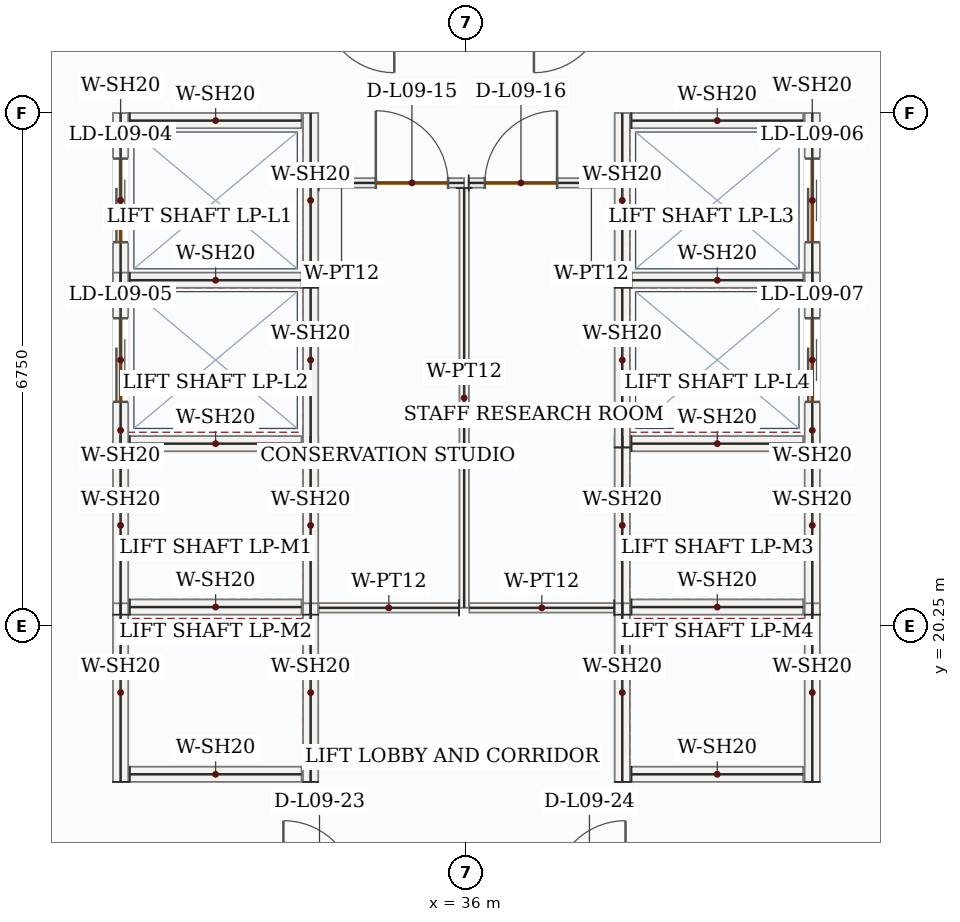
"""IFC4 building model, lengths in metres.
Left out: names, types, materials, properties, quantities, classifications, styles, units other than length and angle.
Written with IfcOpenShell. Run it as: python <this file> out.ifc"""

import sys

from ifc_helpers import new_model, si_unit, direction, frame, frame_2d, origin, place, context, subcontext, project, spatial, rectangle, extrude, source, transform, mapped, element, fill, save


model = new_model("IFC4")
c1 = context("Model", 3, precision=1e-05, world=origin(), true_north=direction((0.0, 1.0)))
c2 = subcontext(c1, "Body", "Model", "MODEL_VIEW")
j1 = project(units=[si_unit("LENGTHUNIT", "METRE"), si_unit("PLANEANGLEUNIT", "RADIAN")], contexts=[c1])
p1 = place(None, origin())
s1 = spatial("IfcSite", under=j1, at=p1, CompositionType="ELEMENT")
p2 = place(p1, origin())
s2 = spatial("IfcBuilding", under=s1, at=p2, CompositionType="ELEMENT")
p3 = place(p2, frame((0.0, 0.0, 45.9)))
s3 = spatial("IfcBuildingStorey", under=s2, at=p3, CompositionType="ELEMENT", Elevation=45.9)
m1 = source(origin(), c2, "Body", "SweptSolid", [
    extrude(rectangle(XDim=2.35, YDim=0.2, at=frame_2d((1.175, 0.0))), origin(), (0.0, 0.0, 1.0), 3.95),
])
for number, where, z_axis, x_axis in (
    (1, (31.45, 20.4, 0.0), (0.0, 0.0, 1.0), (0.0, 1.0, 0.0)),
    (2, (33.95, 20.4, 0.0), (0.0, 0.0, 1.0), (0.0, 1.0, 0.0)),
):
    element("IfcWall", number, at=place(p3, frame(where, z_axis=z_axis, x_axis=x_axis)), inside=s3, PredefinedType="SOLIDWALL", context=c2, shape_type="MappedRepresentation", body=[
        mapped(m1, transform((0.0, 0.0, 0.0), x_axis=(1.0, 0.0, 0.0), y_axis=(0.0, 1.0, 0.0), z_axis=(0.0, 0.0, 1.0), scale=1.0)),
    ])
m2 = source(origin(), c2, "Body", "SweptSolid", [
    extrude(rectangle(XDim=2.26, YDim=0.2, at=frame_2d((1.13, 0.0))), origin(), (0.0, 0.0, 1.0), 3.95),
])
for number, where, z_axis, x_axis in (
    (3, (31.57, 20.5, 0.0), (0.0, 0.0, 1.0), (1.0, 0.0, 0.0)),
    (4, (31.57, 22.65, 0.0), (0.0, 0.0, 1.0), (1.0, 0.0, 0.0)),
):
    element("IfcWall", number, at=place(p3, frame(where, z_axis=z_axis, x_axis=x_axis)), inside=s3, PredefinedType="SOLIDWALL", context=c2, shape_type="MappedRepresentation", body=[
        mapped(m2, transform((0.0, 0.0, 0.0), x_axis=(1.0, 0.0, 0.0), y_axis=(0.0, 1.0, 0.0), z_axis=(0.0, 0.0, 1.0), scale=1.0)),
    ])
for number, where, z_axis, x_axis in (
    (5, (31.45, 18.2, 0.0), (0.0, 0.0, 1.0), (0.0, 1.0, 0.0)),
    (6, (33.95, 18.2, 0.0), (0.0, 0.0, 1.0), (0.0, 1.0, 0.0)),
):
    element("IfcWall", number, at=place(p3, frame(where, z_axis=z_axis, x_axis=x_axis)), inside=s3, PredefinedType="SOLIDWALL", context=c2, shape_type="MappedRepresentation", body=[
        mapped(m1, transform((0.0, 0.0, 0.0), x_axis=(1.0, 0.0, 0.0), y_axis=(0.0, 1.0, 0.0), z_axis=(0.0, 0.0, 1.0), scale=1.0)),
    ])
p4 = place(p3, frame((31.57, 18.3, 0.0), z_axis=(0.0, 0.0, 1.0), x_axis=(1.0, 0.0, 0.0)))
e7 = element("IfcWall", 7, at=p4, inside=s3, PredefinedType="SOLIDWALL", context=c2, shape_type="MappedRepresentation", body=[
    mapped(m2, transform((0.0, 0.0, 0.0), x_axis=(1.0, 0.0, 0.0), y_axis=(0.0, 1.0, 0.0), z_axis=(0.0, 0.0, 1.0), scale=1.0)),
])
for number, where, z_axis, x_axis in (
    (8, (38.05, 20.4, 0.0), (0.0, 0.0, 1.0), (0.0, 1.0, 0.0)),
    (9, (40.55, 20.4, 0.0), (0.0, 0.0, 1.0), (0.0, 1.0, 0.0)),
):
    element("IfcWall", number, at=place(p3, frame(where, z_axis=z_axis, x_axis=x_axis)), inside=s3, PredefinedType="SOLIDWALL", context=c2, shape_type="MappedRepresentation", body=[
        mapped(m1, transform((0.0, 0.0, 0.0), x_axis=(1.0, 0.0, 0.0), y_axis=(0.0, 1.0, 0.0), z_axis=(0.0, 0.0, 1.0), scale=1.0)),
    ])
for number, where, z_axis, x_axis in (
    (10, (38.17, 20.5, 0.0), (0.0, 0.0, 1.0), (1.0, 0.0, 0.0)),
    (11, (38.17, 22.65, 0.0), (0.0, 0.0, 1.0), (1.0, 0.0, 0.0)),
):
    element("IfcWall", number, at=place(p3, frame(where, z_axis=z_axis, x_axis=x_axis)), inside=s3, PredefinedType="SOLIDWALL", context=c2, shape_type="MappedRepresentation", body=[
        mapped(m2, transform((0.0, 0.0, 0.0), x_axis=(1.0, 0.0, 0.0), y_axis=(0.0, 1.0, 0.0), z_axis=(0.0, 0.0, 1.0), scale=1.0)),
    ])
for number, where, z_axis, x_axis in (
    (12, (38.05, 18.2, 0.0), (0.0, 0.0, 1.0), (0.0, 1.0, 0.0)),
    (13, (40.55, 18.2, 0.0), (0.0, 0.0, 1.0), (0.0, 1.0, 0.0)),
):
    element("IfcWall", number, at=place(p3, frame(where, z_axis=z_axis, x_axis=x_axis)), inside=s3, PredefinedType="SOLIDWALL", context=c2, shape_type="MappedRepresentation", body=[
        mapped(m1, transform((0.0, 0.0, 0.0), x_axis=(1.0, 0.0, 0.0), y_axis=(0.0, 1.0, 0.0), z_axis=(0.0, 0.0, 1.0), scale=1.0)),
    ])
p5 = place(p3, frame((38.17, 18.3, 0.0), z_axis=(0.0, 0.0, 1.0), x_axis=(1.0, 0.0, 0.0)))
e14 = element("IfcWall", 14, at=p5, inside=s3, PredefinedType="SOLIDWALL", context=c2, shape_type="MappedRepresentation", body=[
    mapped(m2, transform((0.0, 0.0, 0.0), x_axis=(1.0, 0.0, 0.0), y_axis=(0.0, 1.0, 0.0), z_axis=(0.0, 0.0, 1.0), scale=1.0)),
])
p6 = place(p3, frame((31.45, 24.7, 0.0), z_axis=(0.0, 0.0, 1.0), x_axis=(0.0, 1.0, 0.0)))
e15 = element("IfcWall", 15, at=p6, inside=s3, PredefinedType="SOLIDWALL", context=c2, shape_type="SweptSolid", body=[
    extrude(rectangle(XDim=2.3, YDim=0.2, at=frame_2d((1.15, 0.0))), origin(), (0.0, 0.0, 1.0), 3.95),
])
p7 = place(p6, frame((0.6, 0.0, 0.0)))
e16 = element("IfcOpeningElement", 16, at=p7, cuts=e15, PredefinedType="OPENING", context=c2, shape_type="SweptSolid", body=[
    extrude(rectangle(XDim=1.1, YDim=2.15, at=frame_2d((0.55, 1.075))), frame((0.0, 0.11, 0.0), z_axis=(0.0, -1.0, 0.0), x_axis=(1.0, 0.0, 0.0)), (0.0, 0.0, 1.0), 0.22),
])
m3 = source(origin(), c2, "Body", "SweptSolid", [
    extrude(rectangle(XDim=2.3, YDim=0.2, at=frame_2d((1.15, 0.0))), origin(), (0.0, 0.0, 1.0), 3.95),
])
p8 = place(p3, frame((33.95, 24.7, 0.0), z_axis=(0.0, 0.0, 1.0), x_axis=(0.0, 1.0, 0.0)))
e17 = element("IfcWall", 17, at=p8, inside=s3, PredefinedType="SOLIDWALL", context=c2, shape_type="MappedRepresentation", body=[
    mapped(m3, transform((0.0, 0.0, 0.0), x_axis=(1.0, 0.0, 0.0), y_axis=(0.0, 1.0, 0.0), z_axis=(0.0, 0.0, 1.0), scale=1.0)),
])
for number, where, z_axis, x_axis in (
    (18, (31.57, 24.8, 0.0), (0.0, 0.0, 1.0), (1.0, 0.0, 0.0)),
    (19, (31.57, 26.9, 0.0), (0.0, 0.0, 1.0), (1.0, 0.0, 0.0)),
):
    element("IfcWall", number, at=place(p3, frame(where, z_axis=z_axis, x_axis=x_axis)), inside=s3, PredefinedType="SOLIDWALL", context=c2, shape_type="MappedRepresentation", body=[
        mapped(m2, transform((0.0, 0.0, 0.0), x_axis=(1.0, 0.0, 0.0), y_axis=(0.0, 1.0, 0.0), z_axis=(0.0, 0.0, 1.0), scale=1.0)),
    ])
p9 = place(p3, frame((31.45, 22.6, 0.0), z_axis=(0.0, 0.0, 1.0), x_axis=(0.0, 1.0, 0.0)))
e20 = element("IfcWall", 20, at=p9, inside=s3, PredefinedType="SOLIDWALL", context=c2, shape_type="SweptSolid", body=[
    extrude(rectangle(XDim=2.3, YDim=0.2, at=frame_2d((1.15, 0.0))), origin(), (0.0, 0.0, 1.0), 3.95),
])
p10 = place(p9, frame((0.6, 0.0, 0.0)))
e21 = element("IfcOpeningElement", 21, at=p10, cuts=e20, PredefinedType="OPENING", context=c2, shape_type="SweptSolid", body=[
    extrude(rectangle(XDim=1.1, YDim=2.15, at=frame_2d((0.55, 1.075))), frame((0.0, 0.11, 0.0), z_axis=(0.0, -1.0, 0.0), x_axis=(1.0, 0.0, 0.0)), (0.0, 0.0, 1.0), 0.22),
])
m4 = source(origin(), c2, "Body", "SweptSolid", [
    extrude(rectangle(XDim=2.3, YDim=0.2, at=frame_2d((1.15, 0.0))), origin(), (0.0, 0.0, 1.0), 3.95),
])
p11 = place(p3, frame((33.95, 22.6, 0.0), z_axis=(0.0, 0.0, 1.0), x_axis=(0.0, 1.0, 0.0)))
e22 = element("IfcWall", 22, at=p11, inside=s3, PredefinedType="SOLIDWALL", context=c2, shape_type="MappedRepresentation", body=[
    mapped(m4, transform((0.0, 0.0, 0.0), x_axis=(1.0, 0.0, 0.0), y_axis=(0.0, 1.0, 0.0), z_axis=(0.0, 0.0, 1.0), scale=1.0)),
])
p12 = place(p3, frame((38.05, 24.7, 0.0), z_axis=(0.0, 0.0, 1.0), x_axis=(0.0, 1.0, 0.0)))
e23 = element("IfcWall", 23, at=p12, inside=s3, PredefinedType="SOLIDWALL", context=c2, shape_type="MappedRepresentation", body=[
    mapped(m3, transform((0.0, 0.0, 0.0), x_axis=(1.0, 0.0, 0.0), y_axis=(0.0, 1.0, 0.0), z_axis=(0.0, 0.0, 1.0), scale=1.0)),
])
p13 = place(p3, frame((40.55, 24.7, 0.0), z_axis=(0.0, 0.0, 1.0), x_axis=(0.0, 1.0, 0.0)))
e24 = element("IfcWall", 24, at=p13, inside=s3, PredefinedType="SOLIDWALL", context=c2, shape_type="SweptSolid", body=[
    extrude(rectangle(XDim=2.3, YDim=0.2, at=frame_2d((1.15, 0.0))), origin(), (0.0, 0.0, 1.0), 3.95),
])
p14 = place(p13, frame((0.6, 0.0, 0.0)))
e25 = element("IfcOpeningElement", 25, at=p14, cuts=e24, PredefinedType="OPENING", context=c2, shape_type="SweptSolid", body=[
    extrude(rectangle(XDim=1.1, YDim=2.15, at=frame_2d((0.55, 1.075))), frame((0.0, 0.11, 0.0), z_axis=(0.0, -1.0, 0.0), x_axis=(1.0, 0.0, 0.0)), (0.0, 0.0, 1.0), 0.22),
])
for number, where, z_axis, x_axis in (
    (26, (38.17, 24.8, 0.0), (0.0, 0.0, 1.0), (1.0, 0.0, 0.0)),
    (27, (38.17, 26.9, 0.0), (0.0, 0.0, 1.0), (1.0, 0.0, 0.0)),
):
    element("IfcWall", number, at=place(p3, frame(where, z_axis=z_axis, x_axis=x_axis)), inside=s3, PredefinedType="SOLIDWALL", context=c2, shape_type="MappedRepresentation", body=[
        mapped(m2, transform((0.0, 0.0, 0.0), x_axis=(1.0, 0.0, 0.0), y_axis=(0.0, 1.0, 0.0), z_axis=(0.0, 0.0, 1.0), scale=1.0)),
    ])
p15 = place(p3, frame((38.05, 22.6, 0.0), z_axis=(0.0, 0.0, 1.0), x_axis=(0.0, 1.0, 0.0)))
e28 = element("IfcWall", 28, at=p15, inside=s3, PredefinedType="SOLIDWALL", context=c2, shape_type="MappedRepresentation", body=[
    mapped(m4, transform((0.0, 0.0, 0.0), x_axis=(1.0, 0.0, 0.0), y_axis=(0.0, 1.0, 0.0), z_axis=(0.0, 0.0, 1.0), scale=1.0)),
])
p16 = place(p3, frame((40.55, 22.6, 0.0), z_axis=(0.0, 0.0, 1.0), x_axis=(0.0, 1.0, 0.0)))
e29 = element("IfcWall", 29, at=p16, inside=s3, PredefinedType="SOLIDWALL", context=c2, shape_type="SweptSolid", body=[
    extrude(rectangle(XDim=2.3, YDim=0.2, at=frame_2d((1.15, 0.0))), origin(), (0.0, 0.0, 1.0), 3.95),
])
p17 = place(p16, frame((0.6, 0.0, 0.0)))
e30 = element("IfcOpeningElement", 30, at=p17, cuts=e29, PredefinedType="OPENING", context=c2, shape_type="SweptSolid", body=[
    extrude(rectangle(XDim=1.1, YDim=2.15, at=frame_2d((0.55, 1.075))), frame((0.0, 0.11, 0.0), z_axis=(0.0, -1.0, 0.0), x_axis=(1.0, 0.0, 0.0)), (0.0, 0.0, 1.0), 0.22),
])
p18 = place(p3, frame((34.055, 26.08, 0.0), z_axis=(0.0, 0.0, 1.0), x_axis=(1.0, 0.0, 0.0)))
e31 = element("IfcWall", 31, at=p18, inside=s3, PredefinedType="PARTITIONING", context=c2, shape_type="SweptSolid", body=[
    extrude(rectangle(XDim=1.915, YDim=0.125, at=frame_2d((0.958, 0.0))), origin(), (0.0, 0.0, 1.0), 3.95),
])
p19 = place(p18, frame((0.753, 0.0, 0.0)))
e32 = element("IfcOpeningElement", 32, at=p19, cuts=e31, PredefinedType="OPENING", context=c2, shape_type="SweptSolid", body=[
    extrude(rectangle(XDim=0.95, YDim=2.15, at=frame_2d((0.475, 1.075))), frame((0.0, 0.073, 0.0), z_axis=(0.0, -1.0, 0.0), x_axis=(1.0, 0.0, 0.0)), (0.0, 0.0, 1.0), 0.145),
])
m5 = source(origin(), c2, "Body", "SweptSolid", [
    extrude(rectangle(XDim=5.522, YDim=0.125, at=frame_2d((2.761, 0.0))), origin(), (0.0, 0.0, 1.0), 3.95),
])
p20 = place(p3, frame((35.97, 26.012, 0.0), z_axis=(0.0, 0.0, 1.0), x_axis=(0.0, -1.0, 0.0)))
e33 = element("IfcWall", 33, at=p20, inside=s3, PredefinedType="PARTITIONING", context=c2, shape_type="MappedRepresentation", body=[
    mapped(m5, transform((0.0, 0.0, 0.0), x_axis=(1.0, 0.0, 0.0), y_axis=(0.0, 1.0, 0.0), z_axis=(0.0, 0.0, 1.0), scale=1.0)),
])
m6 = source(origin(), c2, "Body", "SweptSolid", [
    extrude(rectangle(XDim=1.848, YDim=0.125, at=frame_2d((0.924, 0.0))), origin(), (0.0, 0.0, 1.0), 3.95),
])
p21 = place(p3, frame((35.903, 20.49, 0.0), z_axis=(0.0, 0.0, 1.0), x_axis=(-1.0, 0.0, 0.0)))
e34 = element("IfcWall", 34, at=p21, inside=s3, PredefinedType="PARTITIONING", context=c2, shape_type="MappedRepresentation", body=[
    mapped(m6, transform((0.0, 0.0, 0.0), x_axis=(1.0, 0.0, 0.0), y_axis=(0.0, 1.0, 0.0), z_axis=(0.0, 0.0, 1.0), scale=1.0)),
])
p22 = place(p3, frame((36.03, 26.08, 0.0), z_axis=(0.0, 0.0, 1.0), x_axis=(1.0, 0.0, 0.0)))
e35 = element("IfcWall", 35, at=p22, inside=s3, PredefinedType="PARTITIONING", context=c2, shape_type="SweptSolid", body=[
    extrude(rectangle(XDim=1.915, YDim=0.125, at=frame_2d((0.958, 0.0))), origin(), (0.0, 0.0, 1.0), 3.95),
])
p23 = place(p22, frame((0.212, 0.0, 0.0)))
e36 = element("IfcOpeningElement", 36, at=p23, cuts=e35, PredefinedType="OPENING", context=c2, shape_type="SweptSolid", body=[
    extrude(rectangle(XDim=0.95, YDim=2.15, at=frame_2d((0.475, 1.075))), frame((0.0, 0.073, 0.0), z_axis=(0.0, -1.0, 0.0), x_axis=(1.0, 0.0, 0.0)), (0.0, 0.0, 1.0), 0.145),
])
m7 = source(origin(), c2, "Body", "SweptSolid", [
    extrude(rectangle(XDim=1.907, YDim=0.125, at=frame_2d((0.954, 0.0))), origin(), (0.0, 0.0, 1.0), 3.95),
])
p24 = place(p3, frame((37.945, 20.49, 0.0), z_axis=(0.0, 0.0, 1.0), x_axis=(-1.0, 0.0, 0.0)))
e37 = element("IfcWall", 37, at=p24, inside=s3, PredefinedType="PARTITIONING", context=c2, shape_type="MappedRepresentation", body=[
    mapped(m7, transform((0.0, 0.0, 0.0), x_axis=(1.0, 0.0, 0.0), y_axis=(0.0, 1.0, 0.0), z_axis=(0.0, 0.0, 1.0), scale=1.0)),
])
m8 = source(origin(), c2, "Body", "SweptSolid", [
    extrude(rectangle(XDim=1.1, YDim=2.15, at=frame_2d((0.55, 1.075))), frame((0.0, 0.025, 0.0), z_axis=(0.0, -1.0, 0.0), x_axis=(1.0, 0.0, 0.0)), (0.0, 0.0, 1.0), 0.05),
])
p25 = place(p7, origin())
e38 = element("IfcDoor", 38, at=p25, inside=s3, OperationType="DOUBLE_DOOR_SLIDING", PredefinedType="DOOR", context=c2, shape_type="MappedRepresentation", body=[
    mapped(m8, transform((0.0, 0.0, 0.0), x_axis=(1.0, 0.0, 0.0), y_axis=(0.0, 1.0, 0.0), z_axis=(0.0, 0.0, 1.0), scale=1.0)),
])
fill(e16, e38)
p26 = place(p10, origin())
e39 = element("IfcDoor", 39, at=p26, inside=s3, OperationType="DOUBLE_DOOR_SLIDING", PredefinedType="DOOR", context=c2, shape_type="MappedRepresentation", body=[
    mapped(m8, transform((0.0, 0.0, 0.0), x_axis=(1.0, 0.0, 0.0), y_axis=(0.0, 1.0, 0.0), z_axis=(0.0, 0.0, 1.0), scale=1.0)),
])
fill(e21, e39)
p27 = place(p14, origin())
e40 = element("IfcDoor", 40, at=p27, inside=s3, OperationType="DOUBLE_DOOR_SLIDING", PredefinedType="DOOR", context=c2, shape_type="MappedRepresentation", body=[
    mapped(m8, transform((0.0, 0.0, 0.0), x_axis=(1.0, 0.0, 0.0), y_axis=(0.0, 1.0, 0.0), z_axis=(0.0, 0.0, 1.0), scale=1.0)),
])
fill(e25, e40)
p28 = place(p17, origin())
e41 = element("IfcDoor", 41, at=p28, inside=s3, OperationType="DOUBLE_DOOR_SLIDING", PredefinedType="DOOR", context=c2, shape_type="MappedRepresentation", body=[
    mapped(m8, transform((0.0, 0.0, 0.0), x_axis=(1.0, 0.0, 0.0), y_axis=(0.0, 1.0, 0.0), z_axis=(0.0, 0.0, 1.0), scale=1.0)),
])
fill(e30, e41)
m9 = source(origin(), c2, "Body", "SweptSolid", [
    extrude(rectangle(XDim=0.95, YDim=2.15, at=frame_2d((0.475, 1.075))), frame((0.0, 0.025, 0.0), z_axis=(0.0, -1.0, 0.0), x_axis=(1.0, 0.0, 0.0)), (0.0, 0.0, 1.0), 0.05),
])
p29 = place(p19, origin())
e42 = element("IfcDoor", 42, at=p29, inside=s3, OperationType="SINGLE_SWING_LEFT", PredefinedType="DOOR", context=c2, shape_type="MappedRepresentation", body=[
    mapped(m9, transform((0.0, 0.0, 0.0), x_axis=(1.0, 0.0, 0.0), y_axis=(0.0, 1.0, 0.0), z_axis=(0.0, 0.0, 1.0), scale=1.0)),
])
fill(e32, e42)
p30 = place(p23, origin())
e43 = element("IfcDoor", 43, at=p30, inside=s3, OperationType="SINGLE_SWING_RIGHT", PredefinedType="DOOR", context=c2, shape_type="MappedRepresentation", body=[
    mapped(m9, transform((0.0, 0.0, 0.0), x_axis=(1.0, 0.0, 0.0), y_axis=(0.0, 1.0, 0.0), z_axis=(0.0, 0.0, 1.0), scale=1.0)),
])
fill(e36, e43)
save(model, sys.argv[1])
